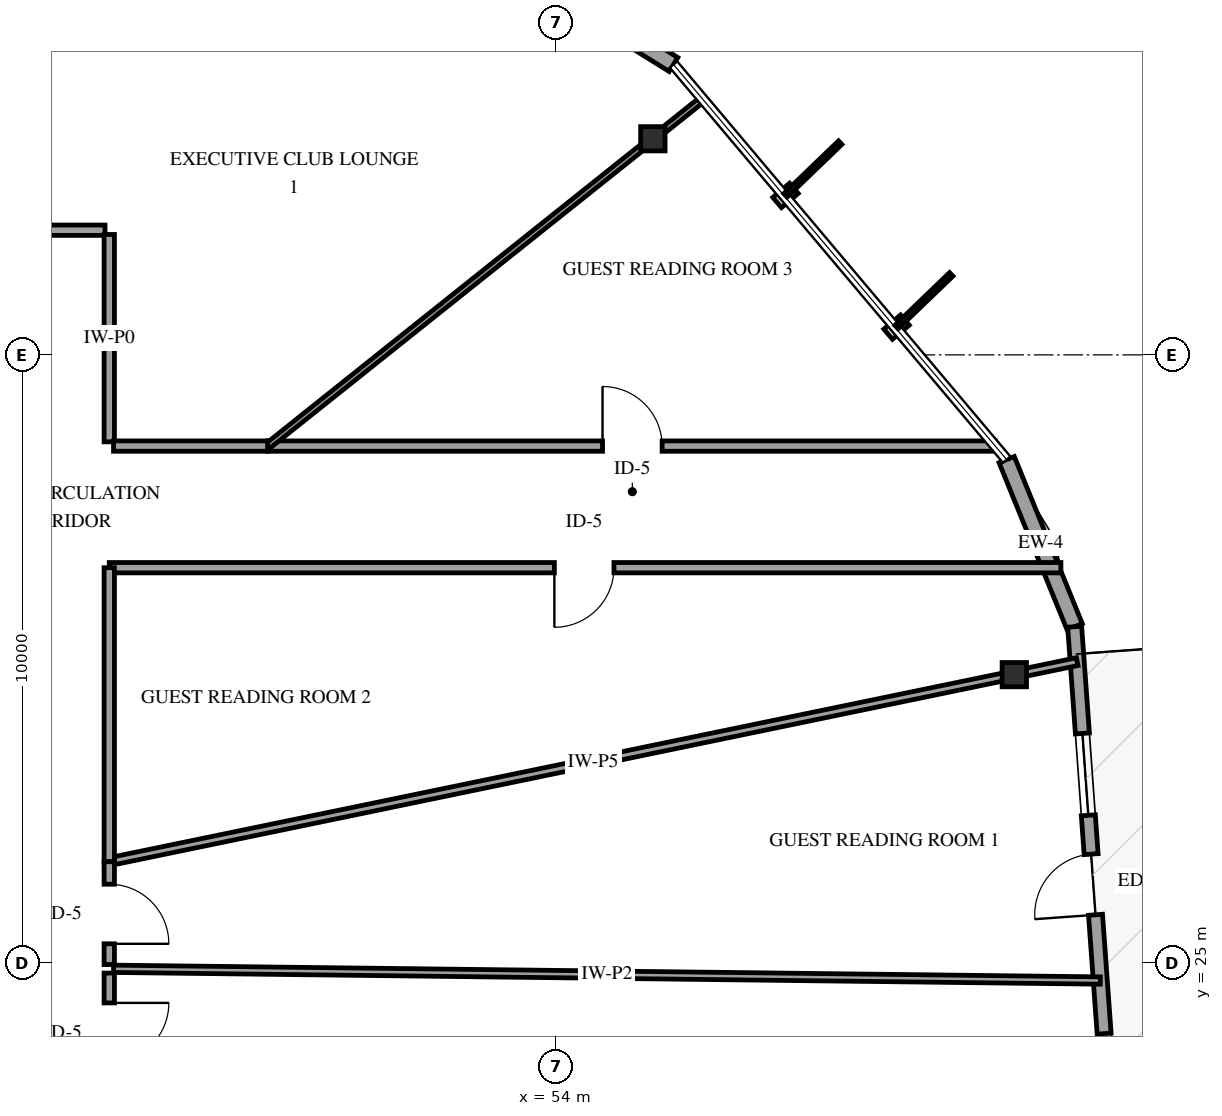
"""IFC4 building model, lengths in metres.
Left out: names, types, materials, properties, quantities, classifications, styles, units other than length and angle.
Written with IfcOpenShell. Run it as: python <this file> out.ifc"""

import sys

from ifc_helpers import new_model, si_unit, direction, frame, frame_2d, origin, origin_2d, place, context, subcontext, project, spatial, rectangle, i_section, extrude, element, fill, save


model = new_model("IFC4")
c1 = context("Model", 3, precision=1e-05, world=origin(), true_north=direction((0.0, 1.0)))
c2 = subcontext(c1, "Body", "Model", "MODEL_VIEW")
j1 = project(units=[si_unit("LENGTHUNIT", "METRE"), si_unit("PLANEANGLEUNIT", "RADIAN")], contexts=[c1])
p1 = place(None, origin())
s1 = spatial("IfcSite", under=j1, at=p1, CompositionType="ELEMENT")
p2 = place(p1, origin())
s2 = spatial("IfcBuilding", under=s1, at=p2, CompositionType="ELEMENT")
p3 = place(p2, frame((0.0, 0.0, 246.25)))
s3 = spatial("IfcBuildingStorey", under=s2, at=p3, CompositionType="ELEMENT", Elevation=246.25)
for number, where, z_axis, x_axis in (
    (1, (61.534, 29.741, 0.0), (0.0, 0.0, 1.0), (1.0, 0.0, 0.0)),
    (2, (55.589, 38.554, 0.0), (0.0, 0.0, 1.0), (1.0, 0.0, 0.0)),
):
    element("IfcColumn", number, at=place(p3, frame(where, z_axis=z_axis, x_axis=x_axis)), inside=s3, PredefinedType="COLUMN", context=c2, shape_type="SweptSolid", body=[
        extrude(i_section(OverallWidth=0.401, OverallDepth=0.399, WebThickness=0.025, FlangeThickness=0.04, FilletRadius=0.038, at=origin_2d()), origin(), (0.0, 0.0, 1.0), 3.75),
    ])
p4 = place(p3, frame((62.526, 30.53, 0.0), z_axis=(0.0, 0.0, 1.0), x_axis=(-0.3768184741, 0.926287124803, 0.0)))
e3 = element("IfcWall", 3, at=p4, inside=s3, PredefinedType="SOLIDWALL", context=c2, shape_type="SweptSolid", body=[
    extrude(rectangle(XDim=2.967, YDim=0.27, at=frame_2d((1.483, 0.0))), origin(), (0.0, 0.0, 1.0), 2.829),
])
p5 = place(p3, frame((63.14, 22.052, 0.0), z_axis=(0.0, 0.0, 1.0), x_axis=(-0.072181914465, 0.997391483433, 0.0)))
e4 = element("IfcWall", 4, at=p5, inside=s3, PredefinedType="SOLIDWALL", context=c2, shape_type="SweptSolid", body=[
    extrude(rectangle(XDim=8.5, YDim=0.23, at=frame_2d((4.25, 0.0))), origin(), (0.0, 0.0, 1.0), 2.829),
])
p6 = place(p5, frame((3.75, 0.0, 0.0)))
e5 = element("IfcOpeningElement", 5, at=p6, cuts=e4, PredefinedType="OPENING", context=c2, shape_type="SweptSolid", body=[
    extrude(rectangle(XDim=1.0, YDim=2.15, at=frame_2d((0.5, 1.075))), frame((0.0, 0.125, 0.0), z_axis=(0.0, -1.0, 0.0), x_axis=(1.0, 0.0, 0.0)), (0.0, 0.0, 1.0), 0.25),
])
p7 = place(p5, frame((0.44, 0.0, 0.72)))
e6 = element("IfcOpeningElement", 6, at=p7, cuts=e4, PredefinedType="OPENING", context=c2, shape_type="SweptSolid", body=[
    extrude(rectangle(XDim=1.35, YDim=1.65, at=frame_2d((0.675, 0.825))), frame((0.0, 0.125, 0.0), z_axis=(0.0, -1.0, 0.0), x_axis=(1.0, 0.0, 0.0)), (0.0, 0.0, 1.0), 0.25),
])
p8 = place(p5, frame((5.39, 0.0, 0.72)))
e7 = element("IfcOpeningElement", 7, at=p8, cuts=e4, PredefinedType="OPENING", context=c2, shape_type="SweptSolid", body=[
    extrude(rectangle(XDim=1.35, YDim=1.65, at=frame_2d((0.675, 0.825))), frame((0.0, 0.125, 0.0), z_axis=(0.0, -1.0, 0.0), x_axis=(1.0, 0.0, 0.0)), (0.0, 0.0, 1.0), 0.25),
])
p9 = place(p3, frame((55.929, 39.775, 0.0), z_axis=(0.0, 0.0, 1.0), x_axis=(-0.849350139028, 0.527829841268, 0.0)))
e8 = element("IfcWall", 8, at=p9, inside=s3, PredefinedType="SOLIDWALL", context=c2, shape_type="SweptSolid", body=[
    extrude(rectangle(XDim=2.967, YDim=0.27, at=frame_2d((1.483, 0.0))), origin(), (0.0, 0.0, 1.0), 2.829),
])
p10 = place(p9, frame((1.033, 0.0, 0.75)))
e9 = element("IfcOpeningElement", 9, at=p10, cuts=e8, PredefinedType="OPENING", context=c2, shape_type="SweptSolid", body=[
    extrude(rectangle(XDim=0.9, YDim=1.5, at=frame_2d((0.45, 0.75))), frame((0.0, 0.145, 0.0), z_axis=(0.0, -1.0, 0.0), x_axis=(1.0, 0.0, 0.0)), (0.0, 0.0, 1.0), 0.29),
])
p11 = place(p3, frame((46.65, 26.665, 0.0), z_axis=(0.0, 0.0, 1.0), x_axis=(0.979301707705, 0.202405941826, 0.0)))
e10 = element("IfcWall", 10, at=p11, inside=s3, PredefinedType="PARTITIONING", context=c2, shape_type="SweptSolid", body=[
    extrude(rectangle(XDim=16.255, YDim=0.13, at=frame_2d((8.127, 0.0))), origin(), (0.0, 0.0, 1.0), 2.745),
])
p12 = place(p3, frame((62.948, 24.711, 0.0), z_axis=(0.0, 0.0, 1.0), x_axis=(-0.999929192745, 0.011899978808, 0.0)))
e11 = element("IfcWall", 11, at=p12, inside=s3, PredefinedType="PARTITIONING", context=c2, shape_type="SweptSolid", body=[
    extrude(rectangle(XDim=16.228, YDim=0.12, at=frame_2d((8.114, 0.0))), origin(), (0.0, 0.0, 1.0), 3.45),
])
p13 = place(p3, frame((62.3, 31.5, 0.0), z_axis=(0.0, 0.0, 1.0), x_axis=(-1.0, 0.0, 0.0)))
e12 = element("IfcWall", 12, at=p13, inside=s3, PredefinedType="PARTITIONING", context=c2, shape_type="SweptSolid", body=[
    extrude(rectangle(XDim=15.65, YDim=0.17, at=frame_2d((7.825, 0.0))), origin(), (0.0, 0.0, 1.0), 3.45),
])
p14 = place(p13, frame((7.35, 0.0, 0.0)))
e13 = element("IfcOpeningElement", 13, at=p14, cuts=e12, PredefinedType="OPENING", context=c2, shape_type="SweptSolid", body=[
    extrude(rectangle(XDim=0.98, YDim=2.15, at=frame_2d((0.49, 1.075))), frame((0.0, 0.095, 0.0), z_axis=(0.0, -1.0, 0.0), x_axis=(1.0, 0.0, 0.0)), (0.0, 0.0, 1.0), 0.19),
])
p15 = place(p3, frame((31.437, 37.05, 0.0), z_axis=(0.0, 0.0, 1.0), x_axis=(1.0, 0.0, 0.0)))
e14 = element("IfcWall", 14, at=p15, inside=s3, PredefinedType="PARTITIONING", context=c2, shape_type="SweptSolid", body=[
    extrude(rectangle(XDim=15.143, YDim=0.17, at=frame_2d((7.572, 0.0))), origin(), (0.0, 0.0, 1.0), 3.45),
])
p16 = place(p15, frame((7.096, 0.0, 0.0)))
e15 = element("IfcOpeningElement", 15, at=p16, cuts=e14, PredefinedType="OPENING", context=c2, shape_type="SweptSolid", body=[
    extrude(rectangle(XDim=0.98, YDim=2.15, at=frame_2d((0.49, 1.075))), frame((0.0, 0.095, 0.0), z_axis=(0.0, -1.0, 0.0), x_axis=(1.0, 0.0, 0.0)), (0.0, 0.0, 1.0), 0.19),
])
p17 = place(p3, frame((49.254, 33.5, 0.0), z_axis=(0.0, 0.0, 1.0), x_axis=(1.0, 0.0, 0.0)))
e16 = element("IfcWall", 16, at=p17, inside=s3, PredefinedType="PARTITIONING", context=c2, shape_type="SweptSolid", body=[
    extrude(rectangle(XDim=11.967, YDim=0.17, at=frame_2d((5.983, 0.0))), origin(), (0.0, 0.0, 1.0), 3.45),
])
p18 = place(p17, frame((5.508, 0.0, 0.0)))
e17 = element("IfcOpeningElement", 17, at=p18, cuts=e16, PredefinedType="OPENING", context=c2, shape_type="SweptSolid", body=[
    extrude(rectangle(XDim=0.98, YDim=2.15, at=frame_2d((0.49, 1.075))), frame((0.0, 0.095, 0.0), z_axis=(0.0, -1.0, 0.0), x_axis=(1.0, 0.0, 0.0)), (0.0, 0.0, 1.0), 0.19),
])
p19 = place(p3, frame((49.254, 33.5, 0.0), z_axis=(0.0, 0.0, 1.0), x_axis=(0.781732154671, 0.623614334628, 0.0)))
e18 = element("IfcWall", 18, at=p19, inside=s3, PredefinedType="PARTITIONING", context=c2, shape_type="SweptSolid", body=[
    extrude(rectangle(XDim=9.152, YDim=0.1, at=frame_2d((4.576, 0.0))), origin(), (0.0, 0.0, 1.0), 3.45),
])
p20 = place(p3, frame((46.65, 31.5, 0.0), z_axis=(0.0, 0.0, 1.0), x_axis=(0.0, -1.0, 0.0)))
e19 = element("IfcWall", 19, at=p20, inside=s3, PredefinedType="PARTITIONING", context=c2, shape_type="SweptSolid", body=[
    extrude(rectangle(XDim=4.835, YDim=0.17, at=frame_2d((2.417, 0.0))), origin(), (0.0, 0.0, 1.0), 3.45),
])
p21 = place(p3, frame((46.65, 36.98, 0.0), z_axis=(0.0, 0.0, 1.0), x_axis=(0.0, -1.0, 0.0)))
e20 = element("IfcWall", 20, at=p21, inside=s3, PredefinedType="PARTITIONING", context=c2, shape_type="SweptSolid", body=[
    extrude(rectangle(XDim=3.41, YDim=0.17, at=frame_2d((1.705, 0.0))), origin(), (0.0, 0.0, 1.0), 3.45),
])
p22 = place(p3, frame((46.72, 33.5, 0.0), z_axis=(0.0, 0.0, 1.0), x_axis=(1.0, 0.0, 0.0)))
e21 = element("IfcWall", 21, at=p22, inside=s3, PredefinedType="PARTITIONING", context=c2, shape_type="SweptSolid", body=[
    extrude(rectangle(XDim=2.534, YDim=0.17, at=frame_2d((1.267, 0.0))), origin(), (0.0, 0.0, 1.0), 3.45),
])
p23 = place(p3, frame((46.65, 24.834, 0.0), z_axis=(0.0, 0.0, 1.0), x_axis=(0.0, -1.0, 0.0)))
e22 = element("IfcWall", 22, at=p23, inside=s3, PredefinedType="PARTITIONING", context=c2, shape_type="SweptSolid", body=[
    extrude(rectangle(XDim=1.933, YDim=0.17, at=frame_2d((0.967, 0.0))), origin(), (0.0, 0.0, 1.0), 3.45),
])
p24 = place(p23, frame((0.491, 0.0, 0.0)))
e23 = element("IfcOpeningElement", 23, at=p24, cuts=e22, PredefinedType="OPENING", context=c2, shape_type="SweptSolid", body=[
    extrude(rectangle(XDim=0.98, YDim=2.15, at=frame_2d((0.49, 1.075))), frame((0.0, 0.095, 0.0), z_axis=(0.0, -1.0, 0.0), x_axis=(1.0, 0.0, 0.0)), (0.0, 0.0, 1.0), 0.19),
])
p25 = place(p3, frame((46.65, 26.665, 0.0), z_axis=(0.0, 0.0, 1.0), x_axis=(0.0, -1.0, 0.0)))
e24 = element("IfcWall", 24, at=p25, inside=s3, PredefinedType="PARTITIONING", context=c2, shape_type="SweptSolid", body=[
    extrude(rectangle(XDim=1.691, YDim=0.17, at=frame_2d((0.845, 0.0))), origin(), (0.0, 0.0, 1.0), 3.45),
])
p26 = place(p25, frame((0.37, 0.0, 0.0)))
e25 = element("IfcOpeningElement", 25, at=p26, cuts=e24, PredefinedType="OPENING", context=c2, shape_type="SweptSolid", body=[
    extrude(rectangle(XDim=0.98, YDim=2.15, at=frame_2d((0.49, 1.075))), frame((0.0, 0.095, 0.0), z_axis=(0.0, -1.0, 0.0), x_axis=(1.0, 0.0, 0.0)), (0.0, 0.0, 1.0), 0.19),
])
p27 = place(p6, origin())
e26 = element("IfcDoor", 26, at=p27, inside=s3, OperationType="SINGLE_SWING_LEFT", PredefinedType="DOOR", context=c2, shape_type="SweptSolid", body=[
    extrude(rectangle(XDim=1.0, YDim=2.15, at=frame_2d((0.5, 1.075))), frame((0.0, 0.025, 0.0), z_axis=(0.0, -1.0, 0.0), x_axis=(1.0, 0.0, 0.0)), (0.0, 0.0, 1.0), 0.05),
])
fill(e5, e26)
p28 = place(p7, origin())
e27 = element("IfcWindow", 27, at=p28, inside=s3, PartitioningType="SINGLE_PANEL", PredefinedType="WINDOW", context=c2, shape_type="SweptSolid", body=[
    extrude(rectangle(XDim=1.35, YDim=1.65, at=frame_2d((0.675, 0.825))), frame((0.0, 0.03, 0.0), z_axis=(0.0, -1.0, 0.0), x_axis=(1.0, 0.0, 0.0)), (0.0, 0.0, 1.0), 0.06),
])
fill(e6, e27)
p29 = place(p8, origin())
e28 = element("IfcWindow", 28, at=p29, inside=s3, PartitioningType="SINGLE_PANEL", PredefinedType="WINDOW", context=c2, shape_type="SweptSolid", body=[
    extrude(rectangle(XDim=1.35, YDim=1.65, at=frame_2d((0.675, 0.825))), frame((0.0, 0.03, 0.0), z_axis=(0.0, -1.0, 0.0), x_axis=(1.0, 0.0, 0.0)), (0.0, 0.0, 1.0), 0.06),
])
fill(e7, e28)
p30 = place(p14, origin())
e29 = element("IfcDoor", 29, at=p30, inside=s3, OperationType="SINGLE_SWING_RIGHT", PredefinedType="DOOR", context=c2, shape_type="SweptSolid", body=[
    extrude(rectangle(XDim=0.98, YDim=2.15, at=frame_2d((0.49, 1.075))), frame((0.0, 0.025, 0.0), z_axis=(0.0, -1.0, 0.0), x_axis=(1.0, 0.0, 0.0)), (0.0, 0.0, 1.0), 0.05),
])
fill(e13, e29)
p31 = place(p18, origin())
e30 = element("IfcDoor", 30, at=p31, inside=s3, OperationType="SINGLE_SWING_LEFT", PredefinedType="DOOR", context=c2, shape_type="SweptSolid", body=[
    extrude(rectangle(XDim=0.98, YDim=2.15, at=frame_2d((0.49, 1.075))), frame((0.0, 0.025, 0.0), z_axis=(0.0, -1.0, 0.0), x_axis=(1.0, 0.0, 0.0)), (0.0, 0.0, 1.0), 0.05),
])
fill(e17, e30)
p32 = place(p24, origin())
e31 = element("IfcDoor", 31, at=p32, inside=s3, OperationType="SINGLE_SWING_LEFT", PredefinedType="DOOR", context=c2, shape_type="SweptSolid", body=[
    extrude(rectangle(XDim=0.98, YDim=2.15, at=frame_2d((0.49, 1.075))), frame((0.0, 0.025, 0.0), z_axis=(0.0, -1.0, 0.0), x_axis=(1.0, 0.0, 0.0)), (0.0, 0.0, 1.0), 0.05),
])
fill(e23, e31)
p33 = place(p26, origin())
e32 = element("IfcDoor", 32, at=p33, inside=s3, OperationType="SINGLE_SWING_RIGHT", PredefinedType="DOOR", context=c2, shape_type="SweptSolid", body=[
    extrude(rectangle(XDim=0.98, YDim=2.15, at=frame_2d((0.49, 1.075))), frame((0.0, 0.025, 0.0), z_axis=(0.0, -1.0, 0.0), x_axis=(1.0, 0.0, 0.0)), (0.0, 0.0, 1.0), 0.05),
])
fill(e25, e32)
save(model, sys.argv[1])
